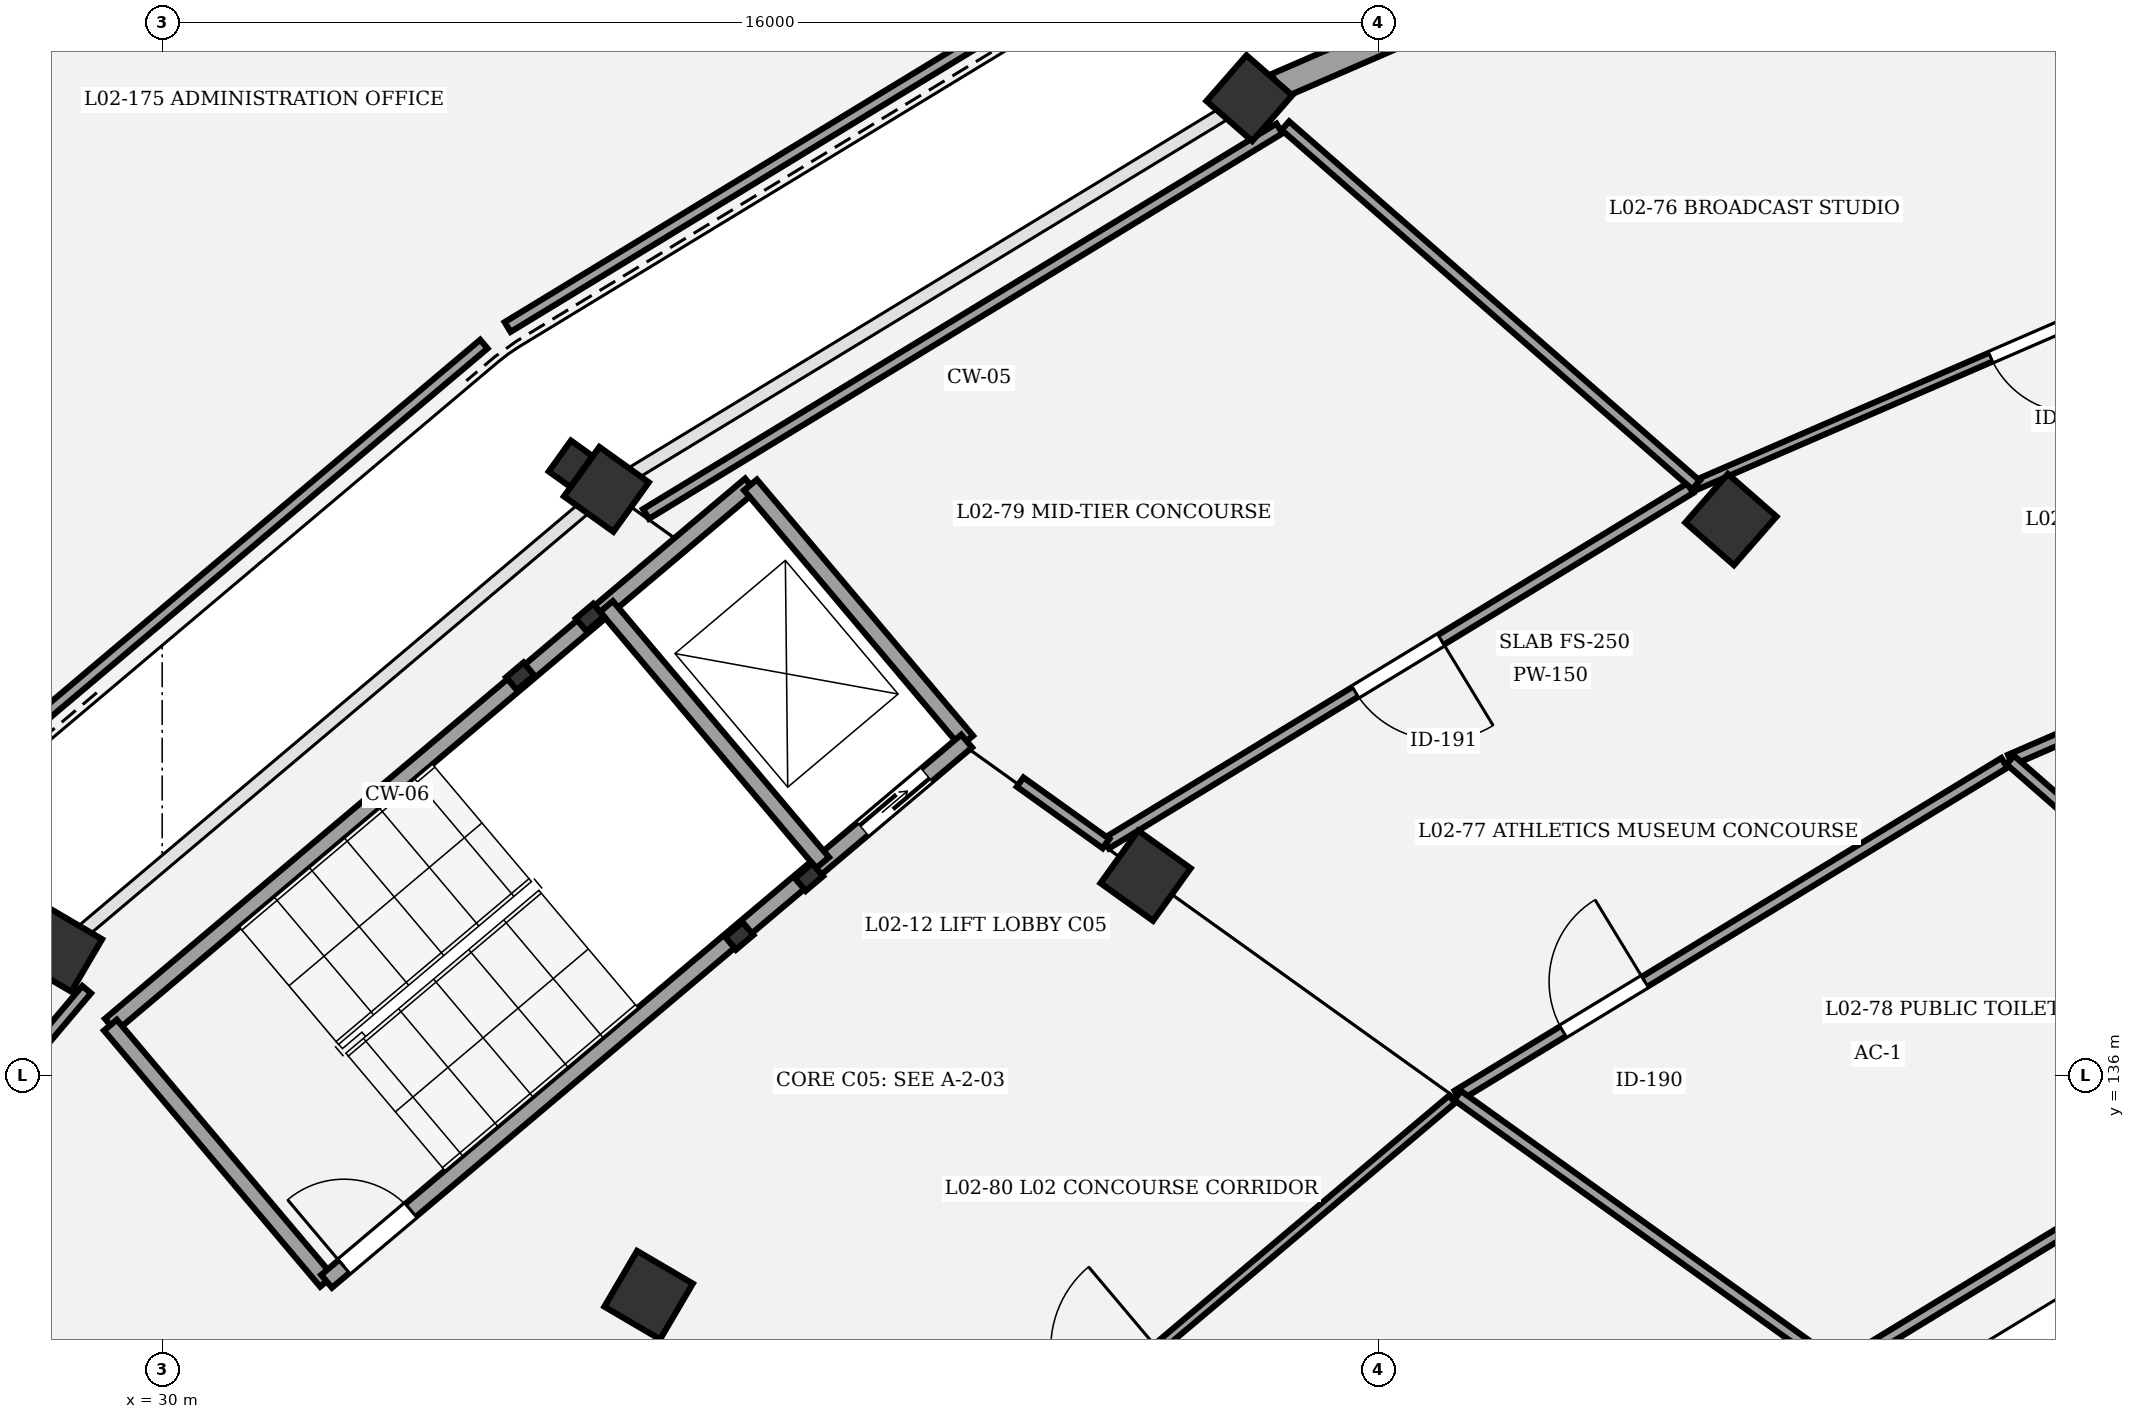
"""IFC4 building model, lengths in metres.
Left out: names, types, materials, properties, quantities, classifications, styles, units other than length and angle.
Written with IfcOpenShell. Run it as: python <this file> out.ifc"""

import sys

from ifc_helpers import new_model, si_unit, direction, frame, frame_2d, origin, origin_2d, place, context, subcontext, project, spatial, rectangle, extrude, element, fill, save


model = new_model("IFC4")
c1 = context("Model", 3, precision=1e-05, world=origin(), true_north=direction((0.0, 1.0)))
c2 = subcontext(c1, "Body", "Model", "MODEL_VIEW")
j1 = project(units=[si_unit("LENGTHUNIT", "METRE"), si_unit("PLANEANGLEUNIT", "RADIAN")], contexts=[c1])
p1 = place(None, origin())
s1 = spatial("IfcSite", under=j1, at=p1, CompositionType="ELEMENT")
p2 = place(p1, origin())
s2 = spatial("IfcBuilding", under=s1, at=p2, CompositionType="ELEMENT")
p3 = place(p2, frame((0.0, 0.0, 10.2)))
s3 = spatial("IfcBuildingStorey", under=s2, at=p3, CompositionType="ELEMENT", Elevation=10.2)
p4 = place(p3, frame((50.64, 143.317, 0.0), z_axis=(0.0, 0.0, 1.0), x_axis=(-0.752529860433, 0.658558128912, 0.0)))
e1 = element("IfcColumn", 1, at=p4, inside=s3, PredefinedType="COLUMN", context=c2, shape_type="SweptSolid", body=[
    extrude(rectangle(XDim=0.85, YDim=0.85, at=origin_2d()), origin(), (0.0, 0.0, 1.0), 4.5),
])
p5 = place(p3, frame((44.304, 148.861, 0.0), z_axis=(0.0, 0.0, 1.0), x_axis=(-0.752529860433, 0.658558128912, 0.0)))
e2 = element("IfcColumn", 2, at=p5, inside=s3, PredefinedType="COLUMN", context=c2, shape_type="SweptSolid", body=[
    extrude(rectangle(XDim=0.8, YDim=0.8, at=origin_2d()), origin(), (0.0, 0.0, 1.0), 4.5),
])
p6 = place(p3, frame((42.939, 138.632, 0.0), z_axis=(0.0, 0.0, 1.0), x_axis=(-0.812897512265, 0.582406760395, 0.0)))
e3 = element("IfcColumn", 3, at=p6, inside=s3, PredefinedType="COLUMN", context=c2, shape_type="SweptSolid", body=[
    extrude(rectangle(XDim=0.85, YDim=0.85, at=origin_2d()), origin(), (0.0, 0.0, 1.0), 4.5),
])
p7 = place(p3, frame((35.844, 143.715, 0.0), z_axis=(0.0, 0.0, 1.0), x_axis=(-0.812897512265, 0.582406760395, 0.0)))
e4 = element("IfcColumn", 4, at=p7, inside=s3, PredefinedType="COLUMN", context=c2, shape_type="SweptSolid", body=[
    extrude(rectangle(XDim=0.8, YDim=0.8, at=origin_2d()), origin(), (0.0, 0.0, 1.0), 4.5),
])
p8 = place(p3, frame((35.375, 144.051, 0.0), z_axis=(0.0, 0.0, 1.0), x_axis=(-0.582406760395, -0.812897512265, 0.0)))
e5 = element("IfcColumn", 5, at=p8, inside=s3, PredefinedType="PILASTER", context=c2, shape_type="SweptSolid", body=[
    extrude(rectangle(XDim=0.5, YDim=0.35, at=origin_2d()), origin(), (0.0, 0.0, 1.0), 4.5),
])
p9 = place(p3, frame((36.4, 133.114, 0.0), z_axis=(0.0, 0.0, 1.0), x_axis=(-0.862513669207, 0.506033764121, 0.0)))
e6 = element("IfcColumn", 6, at=p9, inside=s3, PredefinedType="COLUMN", context=c2, shape_type="SweptSolid", body=[
    extrude(rectangle(XDim=0.85, YDim=0.85, at=origin_2d()), origin(), (0.0, 0.0, 1.0), 4.5),
])
p10 = place(p3, frame((28.662, 137.654, 0.0), z_axis=(0.0, 0.0, 1.0), x_axis=(-0.862513669207, 0.506033764121, 0.0)))
e7 = element("IfcColumn", 7, at=p10, inside=s3, PredefinedType="COLUMN", context=c2, shape_type="SweptSolid", body=[
    extrude(rectangle(XDim=0.8, YDim=0.8, at=origin_2d()), origin(), (0.0, 0.0, 1.0), 4.5),
])
p11 = place(p3, frame((44.669, 149.019, 0.0), z_axis=(0.0, 0.0, 1.0), x_axis=(0.917498288986, 0.397739726088, 0.0)))
e8 = element("IfcWall", 8, at=p11, inside=s3, PredefinedType="STANDARD", context=c2, shape_type="SweptSolid", body=[
    extrude(rectangle(XDim=9.84, YDim=0.35, at=frame_2d((4.92, 0.0))), origin(), (0.0, 0.0, 1.0), 3.42),
])
p12 = place(p11, frame((4.02, 0.0, 0.0)))
e9 = element("IfcOpeningElement", 9, at=p12, cuts=e8, PredefinedType="OPENING", context=c2, shape_type="SweptSolid", body=[
    extrude(rectangle(XDim=1.8, YDim=2.4, at=frame_2d((0.9, 1.2))), frame((0.0, 0.185, 0.0), z_axis=(0.0, -1.0, 0.0), x_axis=(1.0, 0.0, 0.0)), (0.0, 0.0, 1.0), 0.37),
])
for number, where, z_axis, x_axis in (
    (10, (37.593, 137.839, 0.0), (0.0, 0.0, 1.0), (0.764, 0.645, 0.0)),
    (11, (38.51, 138.613, 0.0), (0.0, 0.0, 1.0), (0.764, 0.645, 0.0)),
    (12, (35.627, 142.029, 0.0), (0.0, 0.0, 1.0), (0.764, 0.645, 0.0)),
    (13, (34.71, 141.255, 0.0), (0.0, 0.0, 1.0), (0.764, 0.645, 0.0)),
):
    element("IfcColumn", number, at=place(p3, frame(where, z_axis=z_axis, x_axis=x_axis)), inside=s3, PredefinedType="COLUMN", context=c2, shape_type="SweptSolid", body=[
        extrude(rectangle(XDim=0.3, YDim=0.22, at=origin_2d()), origin(), (0.0, 0.0, 1.0), 4.5),
    ])
p13 = place(p3, frame((29.319, 136.666, 0.0), z_axis=(0.0, 0.0, 1.0), x_axis=(0.764247804305, 0.644922703598, 0.0)))
e14 = element("IfcWall", 14, at=p13, inside=s3, PredefinedType="SHEAR", context=c2, shape_type="SweptSolid", body=[
    extrude(rectangle(XDim=11.02, YDim=0.22, at=frame_2d((5.51, 0.0))), origin(), (0.0, 0.0, 1.0), 4.25),
])
p14 = place(p3, frame((32.163, 133.296, 0.0), z_axis=(0.0, 0.0, 1.0), x_axis=(-0.644904288042, 0.764263344185, 0.0)))
e15 = element("IfcWall", 15, at=p14, inside=s3, PredefinedType="SHEAR", context=c2, shape_type="SweptSolid", body=[
    extrude(rectangle(XDim=4.41, YDim=0.22, at=frame_2d((2.205, 0.0))), origin(), (0.0, 0.0, 1.0), 4.25),
])
p15 = place(p3, frame((40.585, 140.403, 0.0), z_axis=(0.0, 0.0, 1.0), x_axis=(-0.644936622785, 0.764236058159, 0.0)))
e16 = element("IfcWall", 16, at=p15, inside=s3, PredefinedType="SHEAR", context=c2, shape_type="SweptSolid", body=[
    extrude(rectangle(XDim=4.41, YDim=0.22, at=frame_2d((2.205, 0.0))), origin(), (0.0, 0.0, 1.0), 4.25),
])
p16 = place(p3, frame((32.163, 133.296, 0.0), z_axis=(0.0, 0.0, 1.0), x_axis=(0.764257018762, 0.644911784102, 0.0)))
e17 = element("IfcWall", 17, at=p16, inside=s3, PredefinedType="SHEAR", context=c2, shape_type="SweptSolid", body=[
    extrude(rectangle(XDim=11.02, YDim=0.22, at=frame_2d((5.51, 0.0))), origin(), (0.0, 0.0, 1.0), 4.25),
])
p17 = place(p16, frame((0.3, 0.0, 0.0)))
e18 = element("IfcOpeningElement", 18, at=p17, cuts=e17, PredefinedType="OPENING", context=c2, shape_type="SweptSolid", body=[
    extrude(rectangle(XDim=1.15, YDim=2.15, at=frame_2d((0.575, 1.075))), frame((0.0, 0.12, 0.0), z_axis=(0.0, -1.0, 0.0), x_axis=(1.0, 0.0, 0.0)), (0.0, 0.0, 1.0), 0.24),
])
p18 = place(p16, frame((9.23, 0.0, 0.0)))
e19 = element("IfcOpeningElement", 19, at=p18, cuts=e17, PredefinedType="OPENING", context=c2, shape_type="SweptSolid", body=[
    extrude(rectangle(XDim=1.1, YDim=2.15, at=frame_2d((0.55, 1.075))), frame((0.0, 0.12, 0.0), z_axis=(0.0, -1.0, 0.0), x_axis=(1.0, 0.0, 0.0)), (0.0, 0.0, 1.0), 0.24),
])
p19 = place(p3, frame((38.689, 138.803, 0.0), z_axis=(0.0, 0.0, 1.0), x_axis=(-0.644904288042, 0.764263344185, 0.0)))
e20 = element("IfcWall", 20, at=p19, inside=s3, PredefinedType="SHEAR", context=c2, shape_type="SweptSolid", body=[
    extrude(rectangle(XDim=4.41, YDim=0.22, at=frame_2d((2.205, 0.0))), origin(), (0.0, 0.0, 1.0), 4.25),
])
p20 = place(p3, frame((54.315, 140.154, 0.0), z_axis=(0.0, 0.0, 1.0), x_axis=(0.917494590455, 0.397748257677, 0.0)))
e21 = element("IfcWall", 21, at=p20, inside=s3, PredefinedType="PARTITIONING", context=c2, shape_type="SweptSolid", body=[
    extrude(rectangle(XDim=9.049, YDim=0.15, at=frame_2d((4.525, 0.0))), origin(), (0.0, 0.0, 1.0), 3.25),
])
p21 = place(p20, frame((1.766, 0.0, 0.0)))
e22 = element("IfcOpeningElement", 22, at=p21, cuts=e21, PredefinedType="OPENING", context=c2, shape_type="SweptSolid", body=[
    extrude(rectangle(XDim=1.18, YDim=2.1, at=frame_2d((0.59, 1.05))), frame((0.0, 0.085, 0.0), z_axis=(0.0, -1.0, 0.0), x_axis=(1.0, 0.0, 0.0)), (0.0, 0.0, 1.0), 0.17),
])
p22 = place(p3, frame((59.054, 147.619, 0.0), z_axis=(0.0, 0.0, 1.0), x_axis=(-0.917508957037, -0.39771511633, 0.0)))
e23 = element("IfcWall", 23, at=p22, inside=s3, PredefinedType="PARTITIONING", context=c2, shape_type="SweptSolid", body=[
    extrude(rectangle(XDim=9.671, YDim=0.125, at=frame_2d((4.836, 0.0))), origin(), (0.0, 0.0, 1.0), 3.25),
])
p23 = place(p22, frame((4.226, 0.0, 0.0)))
e24 = element("IfcOpeningElement", 24, at=p23, cuts=e23, PredefinedType="OPENING", context=c2, shape_type="SweptSolid", body=[
    extrude(rectangle(XDim=1.22, YDim=2.1, at=frame_2d((0.61, 1.05))), frame((0.0, 0.073, 0.0), z_axis=(0.0, -1.0, 0.0), x_axis=(1.0, 0.0, 0.0)), (0.0, 0.0, 1.0), 0.145),
])
p24 = place(p3, frame((47.043, 135.74, 0.0), z_axis=(0.0, 0.0, 1.0), x_axis=(0.854330104408, 0.519730769439, 0.0)))
e25 = element("IfcWall", 25, at=p24, inside=s3, PredefinedType="PARTITIONING", context=c2, shape_type="SweptSolid", body=[
    extrude(rectangle(XDim=8.42, YDim=0.15, at=frame_2d((4.21, 0.0))), origin(), (0.0, 0.0, 1.0), 3.25),
])
p25 = place(p24, frame((1.624, 0.0, 0.0)))
e26 = element("IfcOpeningElement", 26, at=p25, cuts=e25, PredefinedType="OPENING", context=c2, shape_type="SweptSolid", body=[
    extrude(rectangle(XDim=1.26, YDim=2.1, at=frame_2d((0.63, 1.05))), frame((0.0, 0.085, 0.0), z_axis=(0.0, -1.0, 0.0), x_axis=(1.0, 0.0, 0.0)), (0.0, 0.0, 1.0), 0.17),
])
p26 = place(p3, frame((50.105, 143.731, 0.0), z_axis=(0.0, 0.0, 1.0), x_axis=(-0.854321649351, -0.519744667554, 0.0)))
e27 = element("IfcWall", 27, at=p26, inside=s3, PredefinedType="PARTITIONING", context=c2, shape_type="SweptSolid", body=[
    extrude(rectangle(XDim=8.999, YDim=0.15, at=frame_2d((4.499, 0.0))), origin(), (0.0, 0.0, 1.0), 3.25),
])
p27 = place(p26, frame((3.839, 0.0, 0.0)))
e28 = element("IfcOpeningElement", 28, at=p27, cuts=e27, PredefinedType="OPENING", context=c2, shape_type="SweptSolid", body=[
    extrude(rectangle(XDim=1.32, YDim=2.1, at=frame_2d((0.66, 1.05))), frame((0.0, 0.085, 0.0), z_axis=(0.0, -1.0, 0.0), x_axis=(1.0, 0.0, 0.0)), (0.0, 0.0, 1.0), 0.17),
])
p28 = place(p3, frame((40.867, 130.539, 0.0), z_axis=(0.0, 0.0, 1.0), x_axis=(0.764249122867, 0.644921141068, 0.0)))
e29 = element("IfcWall", 29, at=p28, inside=s3, PredefinedType="PARTITIONING", context=c2, shape_type="SweptSolid", body=[
    extrude(rectangle(XDim=7.99, YDim=0.125, at=frame_2d((3.995, 0.0))), origin(), (0.0, 0.0, 1.0), 3.25),
])
p29 = place(p28, frame((1.51, 0.0, 0.0)))
e30 = element("IfcOpeningElement", 30, at=p29, cuts=e29, PredefinedType="OPENING", context=c2, shape_type="SweptSolid", body=[
    extrude(rectangle(XDim=1.4, YDim=2.1, at=frame_2d((0.7, 1.05))), frame((0.0, 0.073, 0.0), z_axis=(0.0, -1.0, 0.0), x_axis=(1.0, 0.0, 0.0)), (0.0, 0.0, 1.0), 0.145),
])
p30 = place(p3, frame((58.784, 136.244, 0.0), z_axis=(0.0, 0.0, 1.0), x_axis=(-0.752558865068, 0.658524984042, 0.0)))
e31 = element("IfcWall", 31, at=p30, inside=s3, PredefinedType="PARTITIONING", context=c2, shape_type="SweptSolid", body=[
    extrude(rectangle(XDim=5.938, YDim=0.15, at=frame_2d((2.969, 0.0))), origin(), (0.0, 0.0, 1.0), 3.25),
])
p31 = place(p3, frame((50.18, 143.772, 0.0), z_axis=(0.0, 0.0, 1.0), x_axis=(-0.752576694707, 0.658504607869, 0.0)))
e32 = element("IfcWall", 32, at=p31, inside=s3, PredefinedType="PARTITIONING", context=c2, shape_type="SweptSolid", body=[
    extrude(rectangle(XDim=7.178, YDim=0.15, at=frame_2d((3.589, 0.0))), origin(), (0.0, 0.0, 1.0), 3.25),
])
p32 = place(p3, frame((58.709, 136.203, 0.0), z_axis=(0.0, 0.0, 1.0), x_axis=(-0.854328586702, -0.519733264226, 0.0)))
e33 = element("IfcWall", 33, at=p32, inside=s3, PredefinedType="PARTITIONING", context=c2, shape_type="SweptSolid", body=[
    extrude(rectangle(XDim=7.793, YDim=0.15, at=frame_2d((3.897, 0.0))), origin(), (0.0, 0.0, 1.0), 3.25),
])
p33 = place(p3, frame((52.051, 132.152, 0.0), z_axis=(0.0, 0.0, 1.0), x_axis=(-0.81288905718, 0.582418561446, 0.0)))
e34 = element("IfcWall", 34, at=p33, inside=s3, PredefinedType="PARTITIONING", context=c2, shape_type="SweptSolid", body=[
    extrude(rectangle(XDim=6.16, YDim=0.15, at=frame_2d((3.08, 0.0))), origin(), (0.0, 0.0, 1.0), 3.25),
])
p34 = place(p3, frame((36.365, 143.391, 0.0), z_axis=(0.0, 0.0, 1.0), x_axis=(0.854323689683, 0.519741313777, 0.0)))
e35 = element("IfcWall", 35, at=p34, inside=s3, PredefinedType="PARTITIONING", context=c2, shape_type="SweptSolid", body=[
    extrude(rectangle(XDim=9.756, YDim=0.15, at=frame_2d((4.878, 0.0))), origin(), (0.0, 0.0, 1.0), 3.25),
])
p35 = place(p3, frame((42.418, 139.054, 0.0), z_axis=(0.0, 0.0, 1.0), x_axis=(-0.812925279681, 0.582368001916, 0.0)))
e36 = element("IfcWall", 36, at=p35, inside=s3, PredefinedType="PARTITIONING", context=c2, shape_type="SweptSolid", body=[
    extrude(rectangle(XDim=1.389, YDim=0.15, at=frame_2d((0.695, 0.0))), origin(), (0.0, 0.0, 1.0), 3.25),
])
p36 = place(p3, frame((23.344, 130.428, 0.0), z_axis=(0.0, 0.0, 1.0), x_axis=(0.645169991826, 0.764039057671, 0.0)))
e37 = element("IfcWall", 37, at=p36, inside=s3, PredefinedType="PARTITIONING", context=c2, shape_type="SweptSolid", body=[
    extrude(rectangle(XDim=8.776, YDim=0.15, at=frame_2d((4.388, 0.0))), origin(), (0.0, 0.0, 1.0), 3.25),
])
p37 = place(p3, frame((43.004, 150.997, 0.0), z_axis=(0.0, 0.0, 1.0), x_axis=(-0.854333268174, -0.519725568826, 0.0)))
e38 = element("IfcWall", 38, at=p37, inside=s3, PredefinedType="PARTITIONING", context=c2, shape_type="SweptSolid", body=[
    extrude(rectangle(XDim=9.902, YDim=0.15, at=frame_2d((4.951, 0.0))), origin(), (0.0, 0.0, 1.0), 3.25),
])
p38 = place(p3, frame((34.232, 145.625, 0.0), z_axis=(0.0, 0.0, 1.0), x_axis=(-0.764245949545, -0.644924901523, 0.0)))
e39 = element("IfcWall", 39, at=p38, inside=s3, PredefinedType="PARTITIONING", context=c2, shape_type="SweptSolid", body=[
    extrude(rectangle(XDim=9.332, YDim=0.15, at=frame_2d((4.666, 0.0))), origin(), (0.0, 0.0, 1.0), 3.25),
])
p39 = place(p17, origin())
e40 = element("IfcDoor", 40, at=p39, inside=s3, OperationType="SINGLE_SWING_LEFT", PredefinedType="DOOR", context=c2, shape_type="SweptSolid", body=[
    extrude(rectangle(XDim=1.15, YDim=2.15, at=frame_2d((0.575, 1.075))), frame((0.0, 0.025, 0.0), z_axis=(0.0, -1.0, 0.0), x_axis=(1.0, 0.0, 0.0)), (0.0, 0.0, 1.0), 0.05),
])
fill(e18, e40)
p40 = place(p18, origin())
e41 = element("IfcDoor", 41, at=p40, inside=s3, OperationType="DOUBLE_DOOR_SLIDING", PredefinedType="DOOR", context=c2, shape_type="SweptSolid", body=[
    extrude(rectangle(XDim=1.1, YDim=2.15, at=frame_2d((0.55, 1.075))), frame((0.0, 0.025, 0.0), z_axis=(0.0, -1.0, 0.0), x_axis=(1.0, 0.0, 0.0)), (0.0, 0.0, 1.0), 0.05),
])
fill(e19, e41)
p41 = place(p23, origin())
e42 = element("IfcDoor", 42, at=p41, inside=s3, OperationType="SINGLE_SWING_LEFT", PredefinedType="DOOR", context=c2, shape_type="SweptSolid", body=[
    extrude(rectangle(XDim=1.22, YDim=2.1, at=frame_2d((0.61, 1.05))), frame((0.0, 0.025, 0.0), z_axis=(0.0, -1.0, 0.0), x_axis=(1.0, 0.0, 0.0)), (0.0, 0.0, 1.0), 0.05),
])
fill(e24, e42)
p42 = place(p25, origin())
e43 = element("IfcDoor", 43, at=p42, inside=s3, OperationType="SINGLE_SWING_RIGHT", PredefinedType="DOOR", context=c2, shape_type="SweptSolid", body=[
    extrude(rectangle(XDim=1.26, YDim=2.1, at=frame_2d((0.63, 1.05))), frame((0.0, 0.025, 0.0), z_axis=(0.0, -1.0, 0.0), x_axis=(1.0, 0.0, 0.0)), (0.0, 0.0, 1.0), 0.05),
])
fill(e26, e43)
p43 = place(p27, origin())
e44 = element("IfcDoor", 44, at=p43, inside=s3, OperationType="SINGLE_SWING_LEFT", PredefinedType="DOOR", context=c2, shape_type="SweptSolid", body=[
    extrude(rectangle(XDim=1.32, YDim=2.1, at=frame_2d((0.66, 1.05))), frame((0.0, 0.025, 0.0), z_axis=(0.0, -1.0, 0.0), x_axis=(1.0, 0.0, 0.0)), (0.0, 0.0, 1.0), 0.05),
])
fill(e28, e44)
save(model, sys.argv[1])
